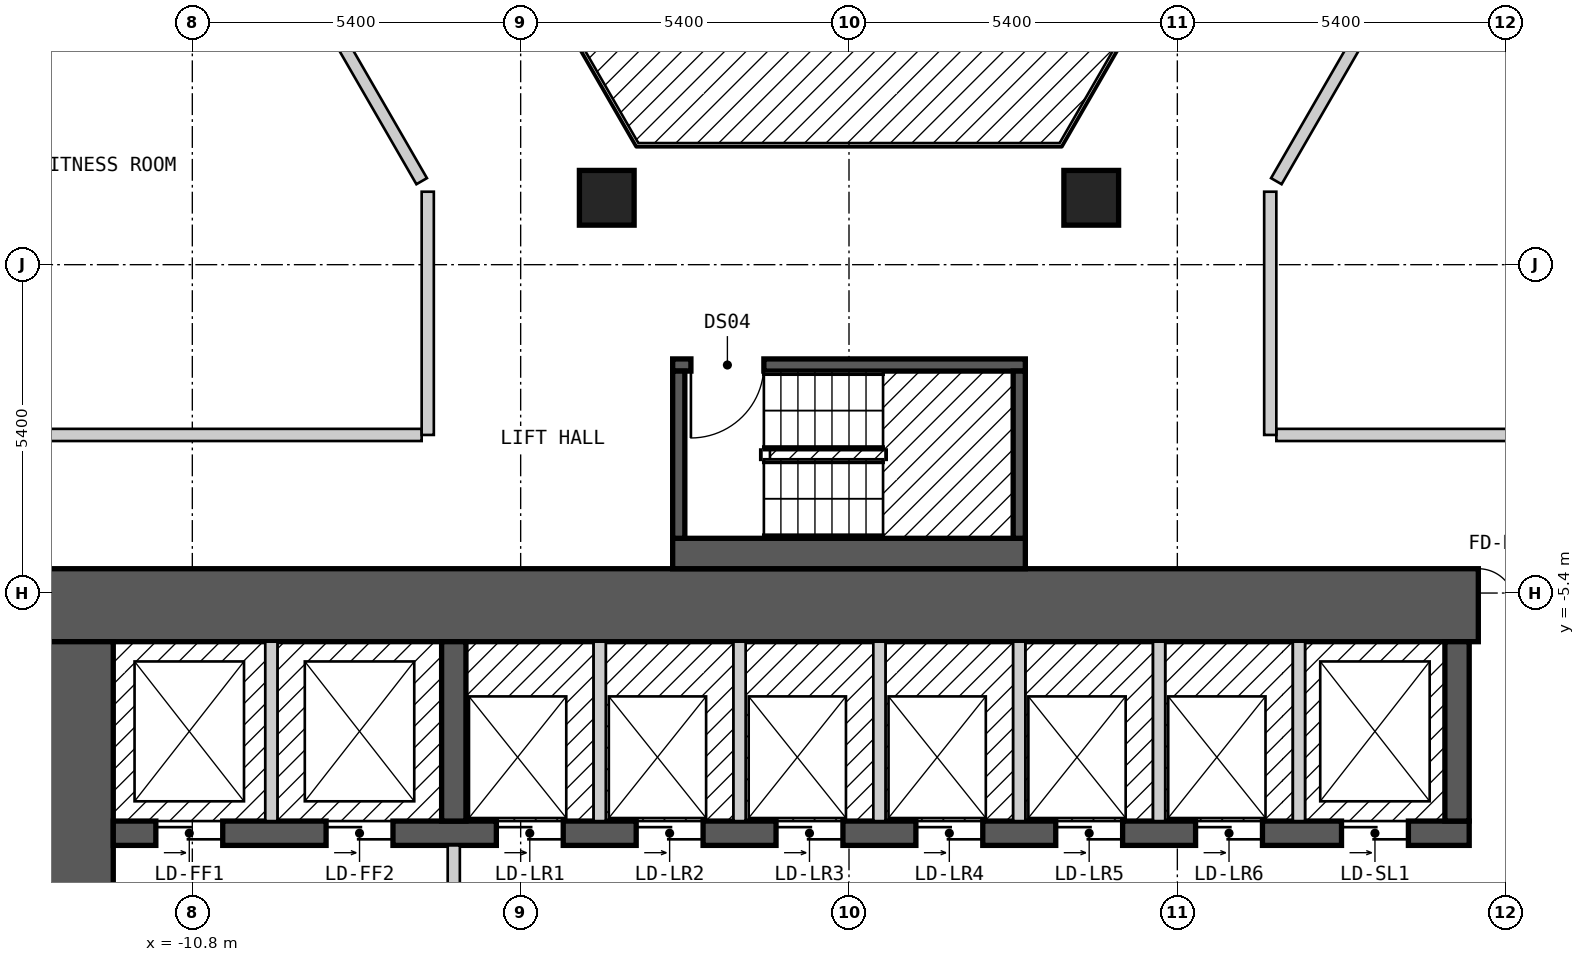
"""IFC4 building model, lengths in metres.
Left out: names, types, materials, properties, quantities, classifications, styles, units other than length and angle.
Written with IfcOpenShell. Run it as: python <this file> out.ifc"""

import sys

from ifc_helpers import new_model, si_unit, direction, frame, frame_2d, origin, origin_2d, place, context, subcontext, project, spatial, rectangle, extrude, element, fill, save


model = new_model("IFC4")
c1 = context("Model", 3, precision=1e-05, world=origin(), true_north=direction((0.0, 1.0)))
c2 = subcontext(c1, "Body", "Model", "MODEL_VIEW")
j1 = project(units=[si_unit("LENGTHUNIT", "METRE"), si_unit("PLANEANGLEUNIT", "RADIAN")], contexts=[c1])
p1 = place(None, origin())
s1 = spatial("IfcSite", under=j1, at=p1, CompositionType="ELEMENT")
p2 = place(p1, origin())
s2 = spatial("IfcBuilding", under=s1, at=p2, CompositionType="ELEMENT")
p3 = place(p2, frame((0.0, 0.0, 41.4)))
s3 = spatial("IfcBuildingStorey", under=s2, at=p3, CompositionType="ELEMENT", Elevation=41.4)
for number, where, z_axis, x_axis in (
    (1, (3.984, 1.1, 0.0), (0.0, 0.0, 1.0), (1.0, 0.0, 0.0)),
    (2, (-3.984, 1.1, 0.0), (0.0, 0.0, 1.0), (1.0, 0.0, 0.0)),
):
    element("IfcColumn", number, at=place(p3, frame(where, z_axis=z_axis, x_axis=x_axis)), inside=s3, PredefinedType="COLUMN", context=c2, shape_type="SweptSolid", body=[
        extrude(rectangle(XDim=0.9, YDim=0.9, at=origin_2d()), origin(), (0.0, 0.0, 1.0), 3.0),
    ])
p4 = place(p3, frame((-13.3, -5.6, 0.0), z_axis=(0.0, 0.0, 1.0), x_axis=(1.0, 0.0, 0.0)))
e3 = element("IfcWall", 3, at=p4, inside=s3, PredefinedType="SHEAR", context=c2, shape_type="SweptSolid", body=[
    extrude(rectangle(XDim=26.6, YDim=1.2, at=frame_2d((13.3, 0.0))), origin(), (0.0, 0.0, 1.0), 2.7),
])
p5 = place(p4, frame((23.65, 0.0, 0.0)))
e4 = element("IfcOpeningElement", 4, at=p5, cuts=e3, PredefinedType="OPENING", context=c2, shape_type="SweptSolid", body=[
    extrude(rectangle(XDim=1.2, YDim=2.1, at=frame_2d((0.6, 1.05))), frame((0.0, 0.61, 0.0), z_axis=(0.0, -1.0, 0.0), x_axis=(1.0, 0.0, 0.0)), (0.0, 0.0, 1.0), 1.22),
])
p6 = place(p3, frame((-12.7, -17.8, 0.0), z_axis=(0.0, 0.0, 1.0), x_axis=(0.0, 1.0, 0.0)))
e5 = element("IfcWall", 5, at=p6, inside=s3, PredefinedType="SHEAR", context=c2, shape_type="SweptSolid", body=[
    extrude(rectangle(XDim=11.6, YDim=1.2, at=frame_2d((5.8, 0.0))), origin(), (0.0, 0.0, 1.0), 2.7),
])
p7 = place(p6, frame((3.6, 0.0, 0.0)))
e6 = element("IfcOpeningElement", 6, at=p7, cuts=e5, PredefinedType="OPENING", context=c2, shape_type="SweptSolid", body=[
    extrude(rectangle(XDim=1.2, YDim=2.1, at=frame_2d((0.6, 1.05))), frame((0.0, 0.61, 0.0), z_axis=(0.0, -1.0, 0.0), x_axis=(1.0, 0.0, 0.0)), (0.0, 0.0, 1.0), 1.22),
])
p8 = place(p3, frame((-12.1, -9.35, 0.0), z_axis=(0.0, 0.0, 1.0), x_axis=(1.0, 0.0, 0.0)))
e7 = element("IfcWall", 7, at=p8, inside=s3, PredefinedType="SHEAR", context=c2, shape_type="SweptSolid", body=[
    extrude(rectangle(XDim=22.3, YDim=0.4, at=frame_2d((11.15, 0.0))), origin(), (0.0, 0.0, 1.0), 2.7),
])
p9 = place(p8, frame((0.7, 0.0, 0.0)))
e8 = element("IfcOpeningElement", 8, at=p9, cuts=e7, PredefinedType="OPENING", context=c2, shape_type="SweptSolid", body=[
    extrude(rectangle(XDim=1.1, YDim=2.1, at=frame_2d((0.55, 1.05))), frame((0.0, 0.21, 0.0), z_axis=(0.0, -1.0, 0.0), x_axis=(1.0, 0.0, 0.0)), (0.0, 0.0, 1.0), 0.42),
])
p10 = place(p8, frame((3.5, 0.0, 0.0)))
e9 = element("IfcOpeningElement", 9, at=p10, cuts=e7, PredefinedType="OPENING", context=c2, shape_type="SweptSolid", body=[
    extrude(rectangle(XDim=1.1, YDim=2.1, at=frame_2d((0.55, 1.05))), frame((0.0, 0.21, 0.0), z_axis=(0.0, -1.0, 0.0), x_axis=(1.0, 0.0, 0.0)), (0.0, 0.0, 1.0), 0.42),
])
p11 = place(p8, frame((6.3, 0.0, 0.0)))
e10 = element("IfcOpeningElement", 10, at=p11, cuts=e7, PredefinedType="OPENING", context=c2, shape_type="SweptSolid", body=[
    extrude(rectangle(XDim=1.1, YDim=2.1, at=frame_2d((0.55, 1.05))), frame((0.0, 0.21, 0.0), z_axis=(0.0, -1.0, 0.0), x_axis=(1.0, 0.0, 0.0)), (0.0, 0.0, 1.0), 0.42),
])
p12 = place(p8, frame((8.6, 0.0, 0.0)))
e11 = element("IfcOpeningElement", 11, at=p12, cuts=e7, PredefinedType="OPENING", context=c2, shape_type="SweptSolid", body=[
    extrude(rectangle(XDim=1.1, YDim=2.1, at=frame_2d((0.55, 1.05))), frame((0.0, 0.21, 0.0), z_axis=(0.0, -1.0, 0.0), x_axis=(1.0, 0.0, 0.0)), (0.0, 0.0, 1.0), 0.42),
])
p13 = place(p8, frame((10.9, 0.0, 0.0)))
e12 = element("IfcOpeningElement", 12, at=p13, cuts=e7, PredefinedType="OPENING", context=c2, shape_type="SweptSolid", body=[
    extrude(rectangle(XDim=1.1, YDim=2.1, at=frame_2d((0.55, 1.05))), frame((0.0, 0.21, 0.0), z_axis=(0.0, -1.0, 0.0), x_axis=(1.0, 0.0, 0.0)), (0.0, 0.0, 1.0), 0.42),
])
p14 = place(p8, frame((13.2, 0.0, 0.0)))
e13 = element("IfcOpeningElement", 13, at=p14, cuts=e7, PredefinedType="OPENING", context=c2, shape_type="SweptSolid", body=[
    extrude(rectangle(XDim=1.1, YDim=2.1, at=frame_2d((0.55, 1.05))), frame((0.0, 0.21, 0.0), z_axis=(0.0, -1.0, 0.0), x_axis=(1.0, 0.0, 0.0)), (0.0, 0.0, 1.0), 0.42),
])
p15 = place(p8, frame((15.5, 0.0, 0.0)))
e14 = element("IfcOpeningElement", 14, at=p15, cuts=e7, PredefinedType="OPENING", context=c2, shape_type="SweptSolid", body=[
    extrude(rectangle(XDim=1.1, YDim=2.1, at=frame_2d((0.55, 1.05))), frame((0.0, 0.21, 0.0), z_axis=(0.0, -1.0, 0.0), x_axis=(1.0, 0.0, 0.0)), (0.0, 0.0, 1.0), 0.42),
])
p16 = place(p8, frame((17.8, 0.0, 0.0)))
e15 = element("IfcOpeningElement", 15, at=p16, cuts=e7, PredefinedType="OPENING", context=c2, shape_type="SweptSolid", body=[
    extrude(rectangle(XDim=1.1, YDim=2.1, at=frame_2d((0.55, 1.05))), frame((0.0, 0.21, 0.0), z_axis=(0.0, -1.0, 0.0), x_axis=(1.0, 0.0, 0.0)), (0.0, 0.0, 1.0), 0.42),
])
p17 = place(p8, frame((20.2, 0.0, 0.0)))
e16 = element("IfcOpeningElement", 16, at=p17, cuts=e7, PredefinedType="OPENING", context=c2, shape_type="SweptSolid", body=[
    extrude(rectangle(XDim=1.1, YDim=2.1, at=frame_2d((0.55, 1.05))), frame((0.0, 0.21, 0.0), z_axis=(0.0, -1.0, 0.0), x_axis=(1.0, 0.0, 0.0)), (0.0, 0.0, 1.0), 0.42),
])
for number, where, z_axis, x_axis in (
    (17, (-6.5, -9.15, 0.0), (0.0, 0.0, 1.0), (0.0, 1.0, 0.0)),
    (18, (10.0, -9.15, 0.0), (0.0, 0.0, 1.0), (0.0, 1.0, 0.0)),
):
    element("IfcWall", number, at=place(p3, frame(where, z_axis=z_axis, x_axis=x_axis)), inside=s3, PredefinedType="SHEAR", context=c2, shape_type="SweptSolid", body=[
        extrude(rectangle(XDim=2.95, YDim=0.4, at=frame_2d((1.475, 0.0))), origin(), (0.0, 0.0, 1.0), 2.7),
    ])
p18 = place(p3, frame((-2.9, -4.75, 0.0), z_axis=(0.0, 0.0, 1.0), x_axis=(1.0, 0.0, 0.0)))
e19 = element("IfcWall", 19, at=p18, inside=s3, PredefinedType="SOLIDWALL", context=c2, shape_type="SweptSolid", body=[
    extrude(rectangle(XDim=5.8, YDim=0.5, at=frame_2d((2.9, 0.0))), origin(), (0.0, 0.0, 1.0), 2.7),
])
p19 = place(p3, frame((-2.9, -1.65, 0.0), z_axis=(0.0, 0.0, 1.0), x_axis=(1.0, 0.0, 0.0)))
e20 = element("IfcWall", 20, at=p19, inside=s3, PredefinedType="SOLIDWALL", context=c2, shape_type="SweptSolid", body=[
    extrude(rectangle(XDim=5.8, YDim=0.2, at=frame_2d((2.9, 0.0))), origin(), (0.0, 0.0, 1.0), 2.7),
])
p20 = place(p19, frame((0.3, 0.0, 0.0)))
e21 = element("IfcOpeningElement", 21, at=p20, cuts=e20, PredefinedType="OPENING", context=c2, shape_type="SweptSolid", body=[
    extrude(rectangle(XDim=1.2, YDim=2.1, at=frame_2d((0.6, 1.05))), frame((0.0, 0.11, 0.0), z_axis=(0.0, -1.0, 0.0), x_axis=(1.0, 0.0, 0.0)), (0.0, 0.0, 1.0), 0.22),
])
for number, where, z_axis, x_axis in (
    (22, (-2.8, -4.5, 0.0), (0.0, 0.0, 1.0), (0.0, 1.0, 0.0)),
    (23, (2.8, -4.5, 0.0), (0.0, 0.0, 1.0), (0.0, 1.0, 0.0)),
):
    element("IfcWall", number, at=place(p3, frame(where, z_axis=z_axis, x_axis=x_axis)), inside=s3, PredefinedType="SOLIDWALL", context=c2, shape_type="SweptSolid", body=[
        extrude(rectangle(XDim=2.75, YDim=0.2, at=frame_2d((1.375, 0.0))), origin(), (0.0, 0.0, 1.0), 2.7),
    ])
p21 = place(p3, frame((-10.796, 7.9, 0.0), z_axis=(0.0, 0.0, 1.0), x_axis=(0.499954271211, -0.866051803703, 0.0)))
e24 = element("IfcWall", 24, at=p21, inside=s3, PredefinedType="PARTITIONING", context=c2, shape_type="SweptSolid", body=[
    extrude(rectangle(XDim=7.536, YDim=0.2, at=frame_2d((3.768, 0.0))), origin(), (0.0, 0.0, 1.0), 2.7),
])
p22 = place(p3, frame((9.18, 15.7, 0.0), z_axis=(0.0, 0.0, 1.0), x_axis=(0.500003652032, -0.866023295272, 0.0)))
e25 = element("IfcWall", 25, at=p22, inside=s3, PredefinedType="PARTITIONING", context=c2, shape_type="SweptSolid", body=[
    extrude(rectangle(XDim=18.012, YDim=0.2, at=frame_2d((9.006, 0.0))), origin(), (0.0, 0.0, 1.0), 2.7),
])
p23 = place(p22, frame((8.556, 0.0, 0.0)))
e26 = element("IfcOpeningElement", 26, at=p23, cuts=e25, PredefinedType="OPENING", context=c2, shape_type="SweptSolid", body=[
    extrude(rectangle(XDim=0.9, YDim=2.1, at=frame_2d((0.45, 1.05))), frame((0.0, 0.11, 0.0), z_axis=(0.0, -1.0, 0.0), x_axis=(1.0, 0.0, 0.0)), (0.0, 0.0, 1.0), 0.22),
])
p24 = place(p3, frame((10.45, 17.9, 0.0), z_axis=(0.0, 0.0, 1.0), x_axis=(0.500034352617, -0.866005569383, 0.0)))
e27 = element("IfcWall", 27, at=p24, inside=s3, PredefinedType="PARTITIONING", context=c2, shape_type="SweptSolid", body=[
    extrude(rectangle(XDim=20.553, YDim=0.2, at=frame_2d((10.276, 0.0))), origin(), (0.0, 0.0, 1.0), 2.7),
])
p25 = place(p24, frame((14.879, 0.0, 0.0)))
e28 = element("IfcOpeningElement", 28, at=p25, cuts=e27, PredefinedType="OPENING", context=c2, shape_type="SweptSolid", body=[
    extrude(rectangle(XDim=1.0, YDim=2.1, at=frame_2d((0.5, 1.05))), frame((0.0, 0.11, 0.0), z_axis=(0.0, -1.0, 0.0), x_axis=(1.0, 0.0, 0.0)), (0.0, 0.0, 1.0), 0.22),
])
p26 = place(p24, frame((9.775, 0.0, 0.0)))
e29 = element("IfcOpeningElement", 29, at=p26, cuts=e27, PredefinedType="OPENING", context=c2, shape_type="SweptSolid", body=[
    extrude(rectangle(XDim=1.0, YDim=2.1, at=frame_2d((0.5, 1.05))), frame((0.0, 0.11, 0.0), z_axis=(0.0, -1.0, 0.0), x_axis=(1.0, 0.0, 0.0)), (0.0, 0.0, 1.0), 0.22),
])
p27 = place(p24, frame((4.671, 0.0, 0.0)))
e30 = element("IfcOpeningElement", 30, at=p27, cuts=e27, PredefinedType="OPENING", context=c2, shape_type="SweptSolid", body=[
    extrude(rectangle(XDim=1.0, YDim=2.1, at=frame_2d((0.5, 1.05))), frame((0.0, 0.11, 0.0), z_axis=(0.0, -1.0, 0.0), x_axis=(1.0, 0.0, 0.0)), (0.0, 0.0, 1.0), 0.22),
])
for number, where, z_axis, x_axis in (
    (31, (-15.4, -2.8, 0.0), (0.0, 0.0, 1.0), (1.0, 0.0, 0.0)),
    (32, (7.028, -2.8, 0.0), (0.0, 0.0, 1.0), (1.0, 0.0, 0.0)),
):
    element("IfcWall", number, at=place(p3, frame(where, z_axis=z_axis, x_axis=x_axis)), inside=s3, PredefinedType="PARTITIONING", context=c2, shape_type="SweptSolid", body=[
        extrude(rectangle(XDim=8.372, YDim=0.2, at=frame_2d((4.186, 0.0))), origin(), (0.0, 0.0, 1.0), 2.7),
    ])
p28 = place(p3, frame((7.028, 1.373, 0.0), z_axis=(0.0, 0.0, 1.0), x_axis=(0.49998574534, 0.86603363356, 0.0)))
e33 = element("IfcWall", 33, at=p28, inside=s3, PredefinedType="PARTITIONING", context=c2, shape_type="SweptSolid", body=[
    extrude(rectangle(XDim=7.652, YDim=0.2, at=frame_2d((3.826, 0.0))), origin(), (0.0, 0.0, 1.0), 2.7),
])
p29 = place(p3, frame((-18.244, -0.001, 0.0), z_axis=(0.0, 0.0, 1.0), x_axis=(0.499962999376, 0.866046765051, 0.0)))
e34 = element("IfcWall", 34, at=p29, inside=s3, PredefinedType="PARTITIONING", context=c2, shape_type="SweptSolid", body=[
    extrude(rectangle(XDim=18.245, YDim=0.2, at=frame_2d((9.123, 0.0))), origin(), (0.0, 0.0, 1.0), 2.7),
])
p30 = place(p29, frame((8.672, 0.0, 0.0)))
e35 = element("IfcOpeningElement", 35, at=p30, cuts=e34, PredefinedType="OPENING", context=c2, shape_type="SweptSolid", body=[
    extrude(rectangle(XDim=0.9, YDim=2.1, at=frame_2d((0.45, 1.05))), frame((0.0, 0.11, 0.0), z_axis=(0.0, -1.0, 0.0), x_axis=(1.0, 0.0, 0.0)), (0.0, 0.0, 1.0), 0.22),
])
p31 = place(p3, frame((-20.727, 0.099, 0.0), z_axis=(0.0, 0.0, 1.0), x_axis=(0.499993204491, 0.866029327138, 0.0)))
e36 = element("IfcWall", 36, at=p31, inside=s3, PredefinedType="PARTITIONING", context=c2, shape_type="SweptSolid", body=[
    extrude(rectangle(XDim=20.554, YDim=0.2, at=frame_2d((10.277, 0.0))), origin(), (0.0, 0.0, 1.0), 2.7),
])
p32 = place(p31, frame((14.88, 0.0, 0.0)))
e37 = element("IfcOpeningElement", 37, at=p32, cuts=e36, PredefinedType="OPENING", context=c2, shape_type="SweptSolid", body=[
    extrude(rectangle(XDim=1.0, YDim=2.1, at=frame_2d((0.5, 1.05))), frame((0.0, 0.11, 0.0), z_axis=(0.0, -1.0, 0.0), x_axis=(1.0, 0.0, 0.0)), (0.0, 0.0, 1.0), 0.22),
])
p33 = place(p31, frame((4.673, 0.0, 0.0)))
e38 = element("IfcOpeningElement", 38, at=p33, cuts=e36, PredefinedType="OPENING", context=c2, shape_type="SweptSolid", body=[
    extrude(rectangle(XDim=1.0, YDim=2.1, at=frame_2d((0.5, 1.05))), frame((0.0, 0.11, 0.0), z_axis=(0.0, -1.0, 0.0), x_axis=(1.0, 0.0, 0.0)), (0.0, 0.0, 1.0), 0.22),
])
p34 = place(p31, frame((0.838, 0.0, 0.0)))
e39 = element("IfcOpeningElement", 39, at=p34, cuts=e36, PredefinedType="OPENING", context=c2, shape_type="SweptSolid", body=[
    extrude(rectangle(XDim=0.8, YDim=2.1, at=frame_2d((0.4, 1.05))), frame((0.0, 0.11, 0.0), z_axis=(0.0, -1.0, 0.0), x_axis=(1.0, 0.0, 0.0)), (0.0, 0.0, 1.0), 0.22),
])
for number, where, z_axis, x_axis in (
    (40, (6.928, -2.8, 0.0), (0.0, 0.0, 1.0), (0.0, 1.0, 0.0)),
    (41, (-6.928, -2.8, 0.0), (0.0, 0.0, 1.0), (0.0, 1.0, 0.0)),
):
    element("IfcWall", number, at=place(p3, frame(where, z_axis=z_axis, x_axis=x_axis)), inside=s3, PredefinedType="PARTITIONING", context=c2, shape_type="SweptSolid", body=[
        extrude(rectangle(XDim=4.0, YDim=0.2, at=frame_2d((2.0, 0.0))), origin(), (0.0, 0.0, 1.0), 2.7),
    ])
p35 = place(p3, frame((-9.5, -9.15, 0.0), z_axis=(0.0, 0.0, 1.0), x_axis=(0.0, 1.0, 0.0)))
e42 = element("IfcWall", 42, at=p35, inside=s3, PredefinedType="SOLIDWALL", context=c2, shape_type="SweptSolid", body=[
    extrude(rectangle(XDim=2.95, YDim=0.2, at=frame_2d((1.475, 0.0))), origin(), (0.0, 0.0, 1.0), 2.7),
])
p36 = place(p3, frame((-6.5, -14.45, 0.0), z_axis=(0.0, 0.0, 1.0), x_axis=(0.0, 1.0, 0.0)))
e43 = element("IfcWall", 43, at=p36, inside=s3, PredefinedType="PARTITIONING", context=c2, shape_type="SweptSolid", body=[
    extrude(rectangle(XDim=4.9, YDim=0.2, at=frame_2d((2.45, 0.0))), origin(), (0.0, 0.0, 1.0), 2.7),
])
p37 = place(p36, frame((3.15, 0.0, 0.0), z_axis=(0.0, 0.0, 1.0), x_axis=(-1.0, 0.0, 0.0)))
e44 = element("IfcOpeningElement", 44, at=p37, cuts=e43, PredefinedType="OPENING", context=c2, shape_type="SweptSolid", body=[
    extrude(rectangle(XDim=1.4, YDim=2.1, at=frame_2d((0.7, 1.05))), frame((0.0, 0.11, 0.0), z_axis=(0.0, -1.0, 0.0), x_axis=(1.0, 0.0, 0.0)), (0.0, 0.0, 1.0), 0.22),
])
for number, where, z_axis, x_axis in (
    (45, (-4.1, -9.15, 0.0), (0.0, 0.0, 1.0), (0.0, 1.0, 0.0)),
    (46, (-1.8, -9.15, 0.0), (0.0, 0.0, 1.0), (0.0, 1.0, 0.0)),
    (47, (0.5, -9.15, 0.0), (0.0, 0.0, 1.0), (0.0, 1.0, 0.0)),
    (48, (2.8, -9.15, 0.0), (0.0, 0.0, 1.0), (0.0, 1.0, 0.0)),
    (49, (5.1, -9.15, 0.0), (0.0, 0.0, 1.0), (0.0, 1.0, 0.0)),
    (50, (7.4, -9.15, 0.0), (0.0, 0.0, 1.0), (0.0, 1.0, 0.0)),
):
    element("IfcWall", number, at=place(p3, frame(where, z_axis=z_axis, x_axis=x_axis)), inside=s3, PredefinedType="SOLIDWALL", context=c2, shape_type="SweptSolid", body=[
        extrude(rectangle(XDim=2.95, YDim=0.2, at=frame_2d((1.475, 0.0))), origin(), (0.0, 0.0, 1.0), 2.7),
    ])
p38 = place(p20, origin())
e51 = element("IfcDoor", 51, at=p38, inside=s3, OperationType="SINGLE_SWING_LEFT", PredefinedType="DOOR", context=c2, shape_type="SweptSolid", body=[
    extrude(rectangle(XDim=1.2, YDim=2.1, at=frame_2d((0.6, 1.05))), frame((0.0, 0.025, 0.0), z_axis=(0.0, -1.0, 0.0), x_axis=(1.0, 0.0, 0.0)), (0.0, 0.0, 1.0), 0.05),
])
fill(e21, e51)
p39 = place(p9, origin())
e52 = element("IfcDoor", 52, at=p39, inside=s3, OperationType="DOUBLE_DOOR_SLIDING", PredefinedType="DOOR", context=c2, shape_type="SweptSolid", body=[
    extrude(rectangle(XDim=1.1, YDim=2.1, at=frame_2d((0.55, 1.05))), frame((0.0, 0.025, 0.0), z_axis=(0.0, -1.0, 0.0), x_axis=(1.0, 0.0, 0.0)), (0.0, 0.0, 1.0), 0.05),
])
fill(e8, e52)
p40 = place(p10, origin())
e53 = element("IfcDoor", 53, at=p40, inside=s3, OperationType="DOUBLE_DOOR_SLIDING", PredefinedType="DOOR", context=c2, shape_type="SweptSolid", body=[
    extrude(rectangle(XDim=1.1, YDim=2.1, at=frame_2d((0.55, 1.05))), frame((0.0, 0.025, 0.0), z_axis=(0.0, -1.0, 0.0), x_axis=(1.0, 0.0, 0.0)), (0.0, 0.0, 1.0), 0.05),
])
fill(e9, e53)
p41 = place(p11, origin())
e54 = element("IfcDoor", 54, at=p41, inside=s3, OperationType="DOUBLE_DOOR_SLIDING", PredefinedType="DOOR", context=c2, shape_type="SweptSolid", body=[
    extrude(rectangle(XDim=1.1, YDim=2.1, at=frame_2d((0.55, 1.05))), frame((0.0, 0.025, 0.0), z_axis=(0.0, -1.0, 0.0), x_axis=(1.0, 0.0, 0.0)), (0.0, 0.0, 1.0), 0.05),
])
fill(e10, e54)
p42 = place(p12, origin())
e55 = element("IfcDoor", 55, at=p42, inside=s3, OperationType="DOUBLE_DOOR_SLIDING", PredefinedType="DOOR", context=c2, shape_type="SweptSolid", body=[
    extrude(rectangle(XDim=1.1, YDim=2.1, at=frame_2d((0.55, 1.05))), frame((0.0, 0.025, 0.0), z_axis=(0.0, -1.0, 0.0), x_axis=(1.0, 0.0, 0.0)), (0.0, 0.0, 1.0), 0.05),
])
fill(e11, e55)
p43 = place(p13, origin())
e56 = element("IfcDoor", 56, at=p43, inside=s3, OperationType="DOUBLE_DOOR_SLIDING", PredefinedType="DOOR", context=c2, shape_type="SweptSolid", body=[
    extrude(rectangle(XDim=1.1, YDim=2.1, at=frame_2d((0.55, 1.05))), frame((0.0, 0.025, 0.0), z_axis=(0.0, -1.0, 0.0), x_axis=(1.0, 0.0, 0.0)), (0.0, 0.0, 1.0), 0.05),
])
fill(e12, e56)
p44 = place(p14, origin())
e57 = element("IfcDoor", 57, at=p44, inside=s3, OperationType="DOUBLE_DOOR_SLIDING", PredefinedType="DOOR", context=c2, shape_type="SweptSolid", body=[
    extrude(rectangle(XDim=1.1, YDim=2.1, at=frame_2d((0.55, 1.05))), frame((0.0, 0.025, 0.0), z_axis=(0.0, -1.0, 0.0), x_axis=(1.0, 0.0, 0.0)), (0.0, 0.0, 1.0), 0.05),
])
fill(e13, e57)
p45 = place(p15, origin())
e58 = element("IfcDoor", 58, at=p45, inside=s3, OperationType="DOUBLE_DOOR_SLIDING", PredefinedType="DOOR", context=c2, shape_type="SweptSolid", body=[
    extrude(rectangle(XDim=1.1, YDim=2.1, at=frame_2d((0.55, 1.05))), frame((0.0, 0.025, 0.0), z_axis=(0.0, -1.0, 0.0), x_axis=(1.0, 0.0, 0.0)), (0.0, 0.0, 1.0), 0.05),
])
fill(e14, e58)
p46 = place(p16, origin())
e59 = element("IfcDoor", 59, at=p46, inside=s3, OperationType="DOUBLE_DOOR_SLIDING", PredefinedType="DOOR", context=c2, shape_type="SweptSolid", body=[
    extrude(rectangle(XDim=1.1, YDim=2.1, at=frame_2d((0.55, 1.05))), frame((0.0, 0.025, 0.0), z_axis=(0.0, -1.0, 0.0), x_axis=(1.0, 0.0, 0.0)), (0.0, 0.0, 1.0), 0.05),
])
fill(e15, e59)
p47 = place(p17, origin())
e60 = element("IfcDoor", 60, at=p47, inside=s3, OperationType="DOUBLE_DOOR_SLIDING", PredefinedType="DOOR", context=c2, shape_type="SweptSolid", body=[
    extrude(rectangle(XDim=1.1, YDim=2.1, at=frame_2d((0.55, 1.05))), frame((0.0, 0.025, 0.0), z_axis=(0.0, -1.0, 0.0), x_axis=(1.0, 0.0, 0.0)), (0.0, 0.0, 1.0), 0.05),
])
fill(e16, e60)
p48 = place(p5, origin())
e61 = element("IfcDoor", 61, at=p48, inside=s3, OperationType="DOUBLE_DOOR_SINGLE_SWING", PredefinedType="DOOR", context=c2, shape_type="SweptSolid", body=[
    extrude(rectangle(XDim=1.2, YDim=2.1, at=frame_2d((0.6, 1.05))), frame((0.0, 0.025, 0.0), z_axis=(0.0, -1.0, 0.0), x_axis=(1.0, 0.0, 0.0)), (0.0, 0.0, 1.0), 0.05),
])
fill(e4, e61)
save(model, sys.argv[1])
